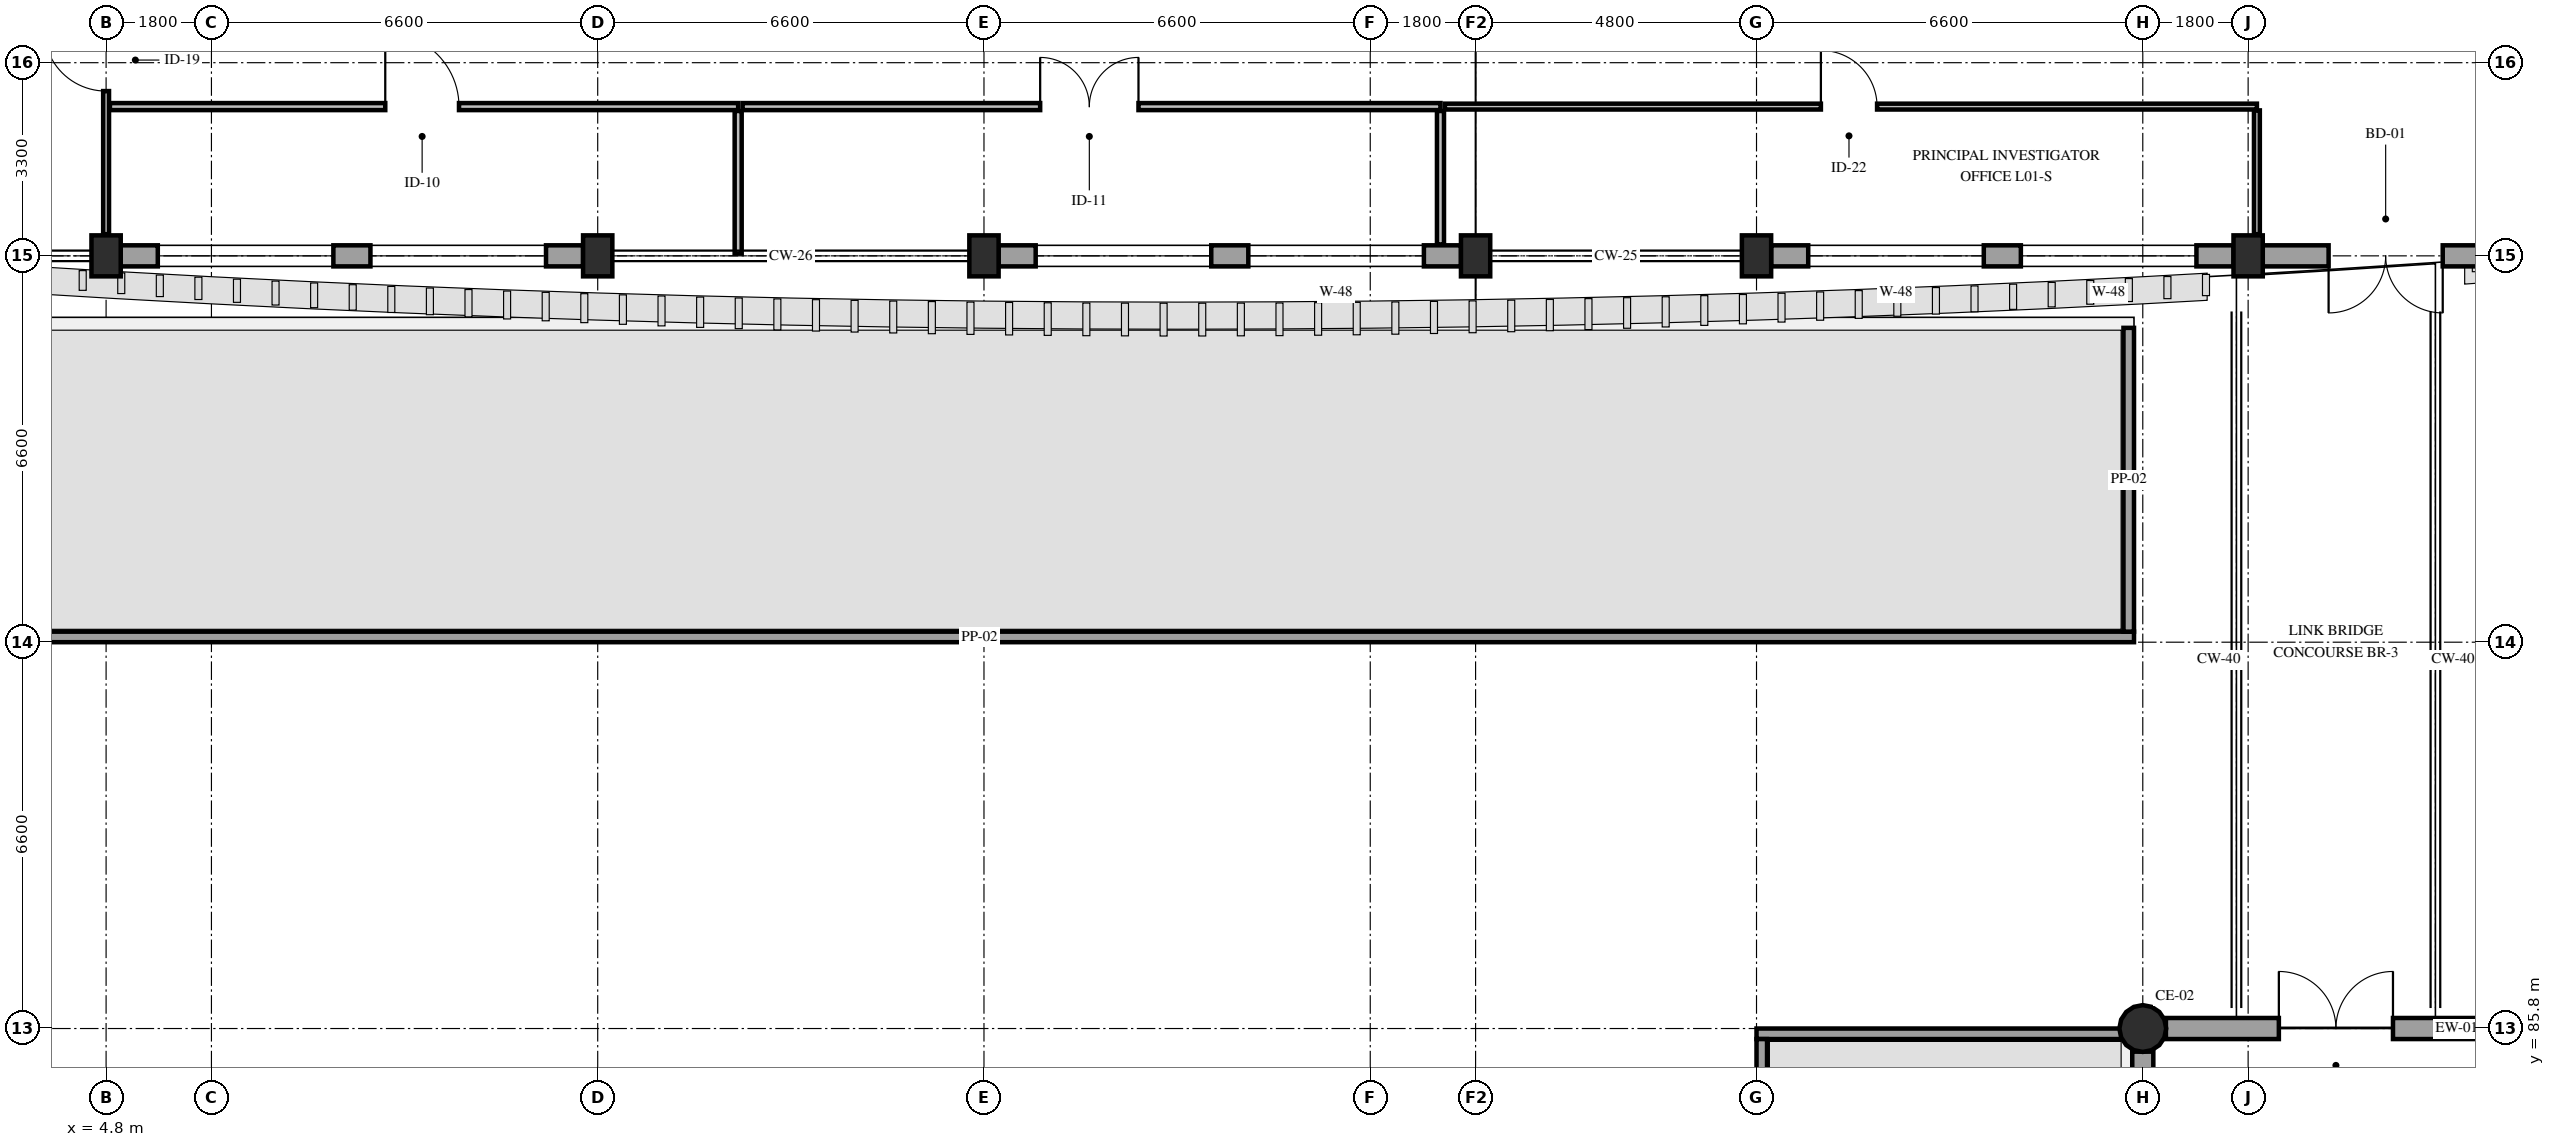
"""IFC4 building model, lengths in metres.
Left out: names, types, materials, properties, quantities, classifications, styles, units other than length and angle.
Written with IfcOpenShell. Run it as: python <this file> out.ifc"""

import sys

from ifc_helpers import new_model, si_unit, direction, frame, frame_2d, origin, origin_2d, place, context, subcontext, project, spatial, rectangle, circle, extrude, element, fill, save


model = new_model("IFC4")
c1 = context("Model", 3, precision=1e-05, world=origin(), true_north=direction((0.0, 1.0)))
c2 = subcontext(c1, "Body", "Model", "MODEL_VIEW")
j1 = project(units=[si_unit("LENGTHUNIT", "METRE"), si_unit("PLANEANGLEUNIT", "RADIAN")], contexts=[c1])
p1 = place(None, origin())
s1 = spatial("IfcSite", under=j1, at=p1, CompositionType="ELEMENT")
p2 = place(p1, origin())
s2 = spatial("IfcBuilding", under=s1, at=p2, CompositionType="ELEMENT")
p3 = place(p2, frame((0.0, 0.0, 5.4)))
s3 = spatial("IfcBuildingStorey", under=s2, at=p3, CompositionType="ELEMENT", Elevation=5.4)
for number, where, z_axis, x_axis in (
    (1, (4.8, 99.0, 0.0), (0.0, 0.0, 1.0), (1.0, 0.0, 0.0)),
    (2, (13.2, 99.0, 0.0), (0.0, 0.0, 1.0), (1.0, 0.0, 0.0)),
    (3, (19.8, 99.0, 0.0), (0.0, 0.0, 1.0), (1.0, 0.0, 0.0)),
    (4, (28.2, 99.0, 0.0), (0.0, 0.0, 1.0), (1.0, 0.0, 0.0)),
    (5, (33.0, 99.0, 0.0), (0.0, 0.0, 1.0), (1.0, 0.0, 0.0)),
    (6, (41.4, 99.0, 0.0), (0.0, 0.0, 1.0), (1.0, 0.0, 0.0)),
):
    element("IfcColumn", number, at=place(p3, frame(where, z_axis=z_axis, x_axis=x_axis)), inside=s3, PredefinedType="PILASTER", context=c2, shape_type="SweptSolid", body=[
        extrude(rectangle(XDim=0.5, YDim=0.7, at=origin_2d()), origin(), (0.0, 0.0, 1.0), 4.8),
    ])
p4 = place(p3, frame((39.6, 85.8, 0.0), z_axis=(0.0, 0.0, 1.0), x_axis=(1.0, 0.0, 0.0)))
e7 = element("IfcColumn", 7, at=p4, inside=s3, PredefinedType="COLUMN", context=c2, shape_type="SweptSolid", body=[
    extrude(circle(Radius=0.4, at=origin_2d()), origin(), (0.0, 0.0, 1.0), 4.8),
])
p5 = place(p3, frame((39.6, 79.595, 0.0), z_axis=(0.0, 0.0, 1.0), x_axis=(0.0, 1.0, 0.0)))
e8 = element("IfcWall", 8, at=p5, inside=s3, PredefinedType="STANDARD", context=c2, shape_type="SweptSolid", body=[
    extrude(rectangle(XDim=5.81, YDim=0.36, at=frame_2d((2.905, 0.0))), origin(), (0.0, 0.0, 1.0), 3.95),
])
p6 = place(p5, frame((1.505, 0.0, 0.85)))
e9 = element("IfcOpeningElement", 9, at=p6, cuts=e8, PredefinedType="OPENING", context=c2, shape_type="SweptSolid", body=[
    extrude(rectangle(XDim=2.8, YDim=1.5, at=frame_2d((1.4, 0.75))), frame((0.0, 0.195, 0.0), z_axis=(0.0, -1.0, 0.0), x_axis=(1.0, 0.0, 0.0)), (0.0, 0.0, 1.0), 0.39),
])
p7 = place(p3, frame((39.995, 85.8, 0.0), z_axis=(0.0, 0.0, 1.0), x_axis=(1.0, 0.0, 0.0)))
e10 = element("IfcWall", 10, at=p7, inside=s3, PredefinedType="STANDARD", context=c2, shape_type="SweptSolid", body=[
    extrude(rectangle(XDim=5.81, YDim=0.36, at=frame_2d((2.905, 0.0))), origin(), (0.0, 0.0, 1.0), 3.95),
])
p8 = place(p7, frame((1.93, 0.0, 0.0)))
e11 = element("IfcOpeningElement", 11, at=p8, cuts=e10, PredefinedType="OPENING", context=c2, shape_type="SweptSolid", body=[
    extrude(rectangle(XDim=1.95, YDim=2.35, at=frame_2d((0.975, 1.175))), frame((0.0, 0.195, 0.0), z_axis=(0.0, -1.0, 0.0), x_axis=(1.0, 0.0, 0.0)), (0.0, 0.0, 1.0), 0.39),
])
p9 = place(p3, frame((45.85, 99.0, 0.0), z_axis=(0.0, 0.0, 1.0), x_axis=(-1.0, 0.0, 0.0)))
e12 = element("IfcWall", 12, at=p9, inside=s3, PredefinedType="STANDARD", context=c2, shape_type="SweptSolid", body=[
    extrude(rectangle(XDim=4.2, YDim=0.36, at=frame_2d((2.1, 0.0))), origin(), (0.0, 0.0, 1.0), 3.36),
])
p10 = place(p9, frame((1.125, 0.0, 0.0)))
e13 = element("IfcOpeningElement", 13, at=p10, cuts=e12, PredefinedType="OPENING", context=c2, shape_type="SweptSolid", body=[
    extrude(rectangle(XDim=1.95, YDim=2.35, at=frame_2d((0.975, 1.175))), frame((0.0, 0.195, 0.0), z_axis=(0.0, -1.0, 0.0), x_axis=(1.0, 0.0, 0.0)), (0.0, 0.0, 1.0), 0.39),
])
p11 = place(p3, frame((41.15, 99.0, 0.0), z_axis=(0.0, 0.0, 1.0), x_axis=(-1.0, 0.0, 0.0)))
e14 = element("IfcWall", 14, at=p11, inside=s3, PredefinedType="STANDARD", context=c2, shape_type="SweptSolid", body=[
    extrude(rectangle(XDim=7.9, YDim=0.36, at=frame_2d((3.95, 0.0))), origin(), (0.0, 0.0, 1.0), 3.36),
])
p12 = place(p11, frame((0.633, 0.0, 0.85)))
e15 = element("IfcOpeningElement", 15, at=p12, cuts=e14, PredefinedType="OPENING", context=c2, shape_type="SweptSolid", body=[
    extrude(rectangle(XDim=3.0, YDim=2.08, at=frame_2d((1.5, 1.04))), frame((0.0, 0.195, 0.0), z_axis=(0.0, -1.0, 0.0), x_axis=(1.0, 0.0, 0.0)), (0.0, 0.0, 1.0), 0.39),
])
p13 = place(p11, frame((4.267, 0.0, 0.85)))
e16 = element("IfcOpeningElement", 16, at=p13, cuts=e14, PredefinedType="OPENING", context=c2, shape_type="SweptSolid", body=[
    extrude(rectangle(XDim=3.0, YDim=2.08, at=frame_2d((1.5, 1.04))), frame((0.0, 0.195, 0.0), z_axis=(0.0, -1.0, 0.0), x_axis=(1.0, 0.0, 0.0)), (0.0, 0.0, 1.0), 0.39),
])
p14 = place(p3, frame((27.95, 99.0, 0.0), z_axis=(0.0, 0.0, 1.0), x_axis=(-1.0, 0.0, 0.0)))
e17 = element("IfcWall", 17, at=p14, inside=s3, PredefinedType="STANDARD", context=c2, shape_type="SweptSolid", body=[
    extrude(rectangle(XDim=7.9, YDim=0.36, at=frame_2d((3.95, 0.0))), origin(), (0.0, 0.0, 1.0), 3.93),
])
p15 = place(p14, frame((0.633, 0.0, 0.85)))
e18 = element("IfcOpeningElement", 18, at=p15, cuts=e17, PredefinedType="OPENING", context=c2, shape_type="SweptSolid", body=[
    extrude(rectangle(XDim=3.0, YDim=2.08, at=frame_2d((1.5, 1.04))), frame((0.0, 0.195, 0.0), z_axis=(0.0, -1.0, 0.0), x_axis=(1.0, 0.0, 0.0)), (0.0, 0.0, 1.0), 0.39),
])
p16 = place(p14, frame((4.267, 0.0, 0.85)))
e19 = element("IfcOpeningElement", 19, at=p16, cuts=e17, PredefinedType="OPENING", context=c2, shape_type="SweptSolid", body=[
    extrude(rectangle(XDim=3.0, YDim=2.08, at=frame_2d((1.5, 1.04))), frame((0.0, 0.195, 0.0), z_axis=(0.0, -1.0, 0.0), x_axis=(1.0, 0.0, 0.0)), (0.0, 0.0, 1.0), 0.39),
])
p17 = place(p3, frame((12.95, 99.0, 0.0), z_axis=(0.0, 0.0, 1.0), x_axis=(-1.0, 0.0, 0.0)))
e20 = element("IfcWall", 20, at=p17, inside=s3, PredefinedType="STANDARD", context=c2, shape_type="SweptSolid", body=[
    extrude(rectangle(XDim=7.9, YDim=0.36, at=frame_2d((3.95, 0.0))), origin(), (0.0, 0.0, 1.0), 3.93),
])
p18 = place(p17, frame((0.633, 0.0, 0.85)))
e21 = element("IfcOpeningElement", 21, at=p18, cuts=e20, PredefinedType="OPENING", context=c2, shape_type="SweptSolid", body=[
    extrude(rectangle(XDim=3.0, YDim=2.08, at=frame_2d((1.5, 1.04))), frame((0.0, 0.195, 0.0), z_axis=(0.0, -1.0, 0.0), x_axis=(1.0, 0.0, 0.0)), (0.0, 0.0, 1.0), 0.39),
])
p19 = place(p17, frame((4.267, 0.0, 0.85)))
e22 = element("IfcOpeningElement", 22, at=p19, cuts=e20, PredefinedType="OPENING", context=c2, shape_type="SweptSolid", body=[
    extrude(rectangle(XDim=3.0, YDim=2.08, at=frame_2d((1.5, 1.04))), frame((0.0, 0.195, 0.0), z_axis=(0.0, -1.0, 0.0), x_axis=(1.0, 0.0, 0.0)), (0.0, 0.0, 1.0), 0.39),
])
p20 = place(p3, frame((0.0, 92.49, 0.0), z_axis=(0.0, 0.0, 1.0), x_axis=(1.0, 0.0, 0.0)))
e23 = element("IfcWall", 23, at=p20, inside=s3, PredefinedType="PARAPET", context=c2, shape_type="SweptSolid", body=[
    extrude(rectangle(XDim=39.45, YDim=0.18, at=frame_2d((19.725, 0.0))), origin(), (0.0, 0.0, 1.0), 1.12),
])
p21 = place(p3, frame((39.36, 92.58, 0.0), z_axis=(0.0, 0.0, 1.0), x_axis=(0.0, 1.0, 0.0)))
e24 = element("IfcWall", 24, at=p21, inside=s3, PredefinedType="PARAPET", context=c2, shape_type="SweptSolid", body=[
    extrude(rectangle(XDim=5.19, YDim=0.18, at=frame_2d((2.595, 0.0))), origin(), (0.0, 0.0, 1.0), 1.12),
])
p22 = place(p3, frame((33.0, 85.71, 0.0), z_axis=(0.0, 0.0, 1.0), x_axis=(1.0, 0.0, 0.0)))
e25 = element("IfcWall", 25, at=p22, inside=s3, PredefinedType="PARAPET", context=c2, shape_type="SweptSolid", body=[
    extrude(rectangle(XDim=6.45, YDim=0.18, at=frame_2d((3.225, 0.0))), origin(), (0.0, 0.0, 1.0), 1.12),
])
p23 = place(p3, frame((33.09, 39.78, 0.0), z_axis=(0.0, 0.0, 1.0), x_axis=(0.0, 1.0, 0.0)))
e26 = element("IfcWall", 26, at=p23, inside=s3, PredefinedType="PARAPET", context=c2, shape_type="SweptSolid", body=[
    extrude(rectangle(XDim=45.84, YDim=0.18, at=frame_2d((22.92, 0.0))), origin(), (0.0, 0.0, 1.0), 1.12),
])
p24 = place(p3, frame((4.8, 99.37, 0.0), z_axis=(0.0, 0.0, 1.0), x_axis=(0.0, 1.0, 0.0)))
e27 = element("IfcWall", 27, at=p24, inside=s3, PredefinedType="PARTITIONING", context=c2, shape_type="SweptSolid", body=[
    extrude(rectangle(XDim=3.755, YDim=0.1, at=frame_2d((1.877, 0.0))), origin(), (0.0, 0.0, 1.0), 4.13),
])
p25 = place(p24, frame((2.445, 0.0, 0.0)))
e28 = element("IfcOpeningElement", 28, at=p25, cuts=e27, PredefinedType="OPENING", context=c2, shape_type="SweptSolid", body=[
    extrude(rectangle(XDim=1.06, YDim=2.2, at=frame_2d((0.53, 1.1))), frame((0.0, 0.065, 0.0), z_axis=(0.0, -1.0, 0.0), x_axis=(1.0, 0.0, 0.0)), (0.0, 0.0, 1.0), 0.13),
])
p26 = place(p3, frame((4.865, 101.55, 0.0), z_axis=(0.0, 0.0, 1.0), x_axis=(1.0, 0.0, 0.0)))
e29 = element("IfcWall", 29, at=p26, inside=s3, PredefinedType="PARTITIONING", context=c2, shape_type="SweptSolid", body=[
    extrude(rectangle(XDim=10.735, YDim=0.12, at=frame_2d((5.368, 0.0))), origin(), (0.0, 0.0, 1.0), 4.13),
])
p27 = place(p26, frame((4.705, 0.0, 0.0)))
e30 = element("IfcOpeningElement", 30, at=p27, cuts=e29, PredefinedType="OPENING", context=c2, shape_type="SweptSolid", body=[
    extrude(rectangle(XDim=1.26, YDim=2.2, at=frame_2d((0.63, 1.1))), frame((0.0, 0.075, 0.0), z_axis=(0.0, -1.0, 0.0), x_axis=(1.0, 0.0, 0.0)), (0.0, 0.0, 1.0), 0.15),
])
p28 = place(p3, frame((15.6, 99.04, 0.0), z_axis=(0.0, 0.0, 1.0), x_axis=(0.0, 1.0, 0.0)))
e31 = element("IfcWall", 31, at=p28, inside=s3, PredefinedType="PARTITIONING", context=c2, shape_type="SweptSolid", body=[
    extrude(rectangle(XDim=2.435, YDim=0.12, at=frame_2d((1.218, 0.0))), origin(), (0.0, 0.0, 1.0), 3.93),
])
p29 = place(p3, frame((15.675, 101.55, 0.0), z_axis=(0.0, 0.0, 1.0), x_axis=(1.0, 0.0, 0.0)))
e32 = element("IfcWall", 32, at=p29, inside=s3, PredefinedType="PARTITIONING", context=c2, shape_type="SweptSolid", body=[
    extrude(rectangle(XDim=11.925, YDim=0.12, at=frame_2d((5.962, 0.0))), origin(), (0.0, 0.0, 1.0), 4.13),
])
p30 = place(p29, frame((5.085, 0.0, 0.0)))
e33 = element("IfcOpeningElement", 33, at=p30, cuts=e32, PredefinedType="OPENING", context=c2, shape_type="SweptSolid", body=[
    extrude(rectangle(XDim=1.68, YDim=2.3, at=frame_2d((0.84, 1.15))), frame((0.0, 0.075, 0.0), z_axis=(0.0, -1.0, 0.0), x_axis=(1.0, 0.0, 0.0)), (0.0, 0.0, 1.0), 0.15),
])
p31 = place(p3, frame((27.6, 99.195, 0.0), z_axis=(0.0, 0.0, 1.0), x_axis=(0.0, 1.0, 0.0)))
e34 = element("IfcWall", 34, at=p31, inside=s3, PredefinedType="PARTITIONING", context=c2, shape_type="SweptSolid", body=[
    extrude(rectangle(XDim=2.28, YDim=0.12, at=frame_2d((1.14, 0.0))), origin(), (0.0, 0.0, 1.0), 3.93),
])
p32 = place(p3, frame((27.675, 101.55, 0.0), z_axis=(0.0, 0.0, 1.0), x_axis=(1.0, 0.0, 0.0)))
e35 = element("IfcWall", 35, at=p32, inside=s3, PredefinedType="PARTITIONING", context=c2, shape_type="SweptSolid", body=[
    extrude(rectangle(XDim=13.875, YDim=0.1, at=frame_2d((6.938, 0.0))), origin(), (0.0, 0.0, 1.0), 4.13),
])
p33 = place(p32, frame((6.425, 0.0, 0.0)))
e36 = element("IfcOpeningElement", 36, at=p33, cuts=e35, PredefinedType="OPENING", context=c2, shape_type="SweptSolid", body=[
    extrude(rectangle(XDim=0.96, YDim=2.15, at=frame_2d((0.48, 1.075))), frame((0.0, 0.065, 0.0), z_axis=(0.0, -1.0, 0.0), x_axis=(1.0, 0.0, 0.0)), (0.0, 0.0, 1.0), 0.13),
])
p34 = place(p3, frame((41.55, 99.37, 0.0), z_axis=(0.0, 0.0, 1.0), x_axis=(0.0, 1.0, 0.0)))
e37 = element("IfcWall", 37, at=p34, inside=s3, PredefinedType="PARTITIONING", context=c2, shape_type="SweptSolid", body=[
    extrude(rectangle(XDim=2.115, YDim=0.1, at=frame_2d((1.058, 0.0))), origin(), (0.0, 0.0, 1.0), 4.13),
])
p35 = place(p8, origin())
e38 = element("IfcDoor", 38, at=p35, inside=s3, OperationType="DOUBLE_DOOR_SINGLE_SWING", PredefinedType="DOOR", context=c2, shape_type="SweptSolid", body=[
    extrude(rectangle(XDim=1.95, YDim=2.35, at=frame_2d((0.975, 1.175))), frame((0.0, 0.025, 0.0), z_axis=(0.0, -1.0, 0.0), x_axis=(1.0, 0.0, 0.0)), (0.0, 0.0, 1.0), 0.05),
])
fill(e11, e38)
p36 = place(p10, origin())
e39 = element("IfcDoor", 39, at=p36, inside=s3, OperationType="DOUBLE_DOOR_SINGLE_SWING", PredefinedType="DOOR", context=c2, shape_type="SweptSolid", body=[
    extrude(rectangle(XDim=1.95, YDim=2.35, at=frame_2d((0.975, 1.175))), frame((0.0, 0.025, 0.0), z_axis=(0.0, -1.0, 0.0), x_axis=(1.0, 0.0, 0.0)), (0.0, 0.0, 1.0), 0.05),
])
fill(e13, e39)
p37 = place(p12, origin())
e40 = element("IfcWindow", 40, at=p37, inside=s3, PartitioningType="DOUBLE_PANEL_VERTICAL", PredefinedType="WINDOW", context=c2, shape_type="SweptSolid", body=[
    extrude(rectangle(XDim=3.0, YDim=2.08, at=frame_2d((1.5, 1.04))), frame((0.0, 0.03, 0.0), z_axis=(0.0, -1.0, 0.0), x_axis=(1.0, 0.0, 0.0)), (0.0, 0.0, 1.0), 0.06),
])
fill(e15, e40)
p38 = place(p13, origin())
e41 = element("IfcWindow", 41, at=p38, inside=s3, PartitioningType="DOUBLE_PANEL_VERTICAL", PredefinedType="WINDOW", context=c2, shape_type="SweptSolid", body=[
    extrude(rectangle(XDim=3.0, YDim=2.08, at=frame_2d((1.5, 1.04))), frame((0.0, 0.03, 0.0), z_axis=(0.0, -1.0, 0.0), x_axis=(1.0, 0.0, 0.0)), (0.0, 0.0, 1.0), 0.06),
])
fill(e16, e41)
p39 = place(p15, origin())
e42 = element("IfcWindow", 42, at=p39, inside=s3, PartitioningType="DOUBLE_PANEL_VERTICAL", PredefinedType="WINDOW", context=c2, shape_type="SweptSolid", body=[
    extrude(rectangle(XDim=3.0, YDim=2.08, at=frame_2d((1.5, 1.04))), frame((0.0, 0.03, 0.0), z_axis=(0.0, -1.0, 0.0), x_axis=(1.0, 0.0, 0.0)), (0.0, 0.0, 1.0), 0.06),
])
fill(e18, e42)
p40 = place(p16, origin())
e43 = element("IfcWindow", 43, at=p40, inside=s3, PartitioningType="DOUBLE_PANEL_VERTICAL", PredefinedType="WINDOW", context=c2, shape_type="SweptSolid", body=[
    extrude(rectangle(XDim=3.0, YDim=2.08, at=frame_2d((1.5, 1.04))), frame((0.0, 0.03, 0.0), z_axis=(0.0, -1.0, 0.0), x_axis=(1.0, 0.0, 0.0)), (0.0, 0.0, 1.0), 0.06),
])
fill(e19, e43)
p41 = place(p18, origin())
e44 = element("IfcWindow", 44, at=p41, inside=s3, PartitioningType="DOUBLE_PANEL_VERTICAL", PredefinedType="WINDOW", context=c2, shape_type="SweptSolid", body=[
    extrude(rectangle(XDim=3.0, YDim=2.08, at=frame_2d((1.5, 1.04))), frame((0.0, 0.03, 0.0), z_axis=(0.0, -1.0, 0.0), x_axis=(1.0, 0.0, 0.0)), (0.0, 0.0, 1.0), 0.06),
])
fill(e21, e44)
p42 = place(p19, origin())
e45 = element("IfcWindow", 45, at=p42, inside=s3, PartitioningType="DOUBLE_PANEL_VERTICAL", PredefinedType="WINDOW", context=c2, shape_type="SweptSolid", body=[
    extrude(rectangle(XDim=3.0, YDim=2.08, at=frame_2d((1.5, 1.04))), frame((0.0, 0.03, 0.0), z_axis=(0.0, -1.0, 0.0), x_axis=(1.0, 0.0, 0.0)), (0.0, 0.0, 1.0), 0.06),
])
fill(e22, e45)
p43 = place(p25, origin())
e46 = element("IfcDoor", 46, at=p43, inside=s3, OperationType="SINGLE_SWING_RIGHT", PredefinedType="DOOR", context=c2, shape_type="SweptSolid", body=[
    extrude(rectangle(XDim=1.06, YDim=2.2, at=frame_2d((0.53, 1.1))), frame((0.0, 0.025, 0.0), z_axis=(0.0, -1.0, 0.0), x_axis=(1.0, 0.0, 0.0)), (0.0, 0.0, 1.0), 0.05),
])
fill(e28, e46)
p44 = place(p27, origin())
e47 = element("IfcDoor", 47, at=p44, inside=s3, OperationType="SINGLE_SWING_LEFT", PredefinedType="DOOR", context=c2, shape_type="SweptSolid", body=[
    extrude(rectangle(XDim=1.26, YDim=2.2, at=frame_2d((0.63, 1.1))), frame((0.0, 0.025, 0.0), z_axis=(0.0, -1.0, 0.0), x_axis=(1.0, 0.0, 0.0)), (0.0, 0.0, 1.0), 0.05),
])
fill(e30, e47)
p45 = place(p30, origin())
e48 = element("IfcDoor", 48, at=p45, inside=s3, OperationType="DOUBLE_DOOR_SINGLE_SWING", PredefinedType="DOOR", context=c2, shape_type="SweptSolid", body=[
    extrude(rectangle(XDim=1.68, YDim=2.3, at=frame_2d((0.84, 1.15))), frame((0.0, 0.025, 0.0), z_axis=(0.0, -1.0, 0.0), x_axis=(1.0, 0.0, 0.0)), (0.0, 0.0, 1.0), 0.05),
])
fill(e33, e48)
p46 = place(p33, origin())
e49 = element("IfcDoor", 49, at=p46, inside=s3, OperationType="SINGLE_SWING_LEFT", PredefinedType="DOOR", context=c2, shape_type="SweptSolid", body=[
    extrude(rectangle(XDim=0.96, YDim=2.15, at=frame_2d((0.48, 1.075))), frame((0.0, 0.025, 0.0), z_axis=(0.0, -1.0, 0.0), x_axis=(1.0, 0.0, 0.0)), (0.0, 0.0, 1.0), 0.05),
])
fill(e36, e49)
save(model, sys.argv[1])
